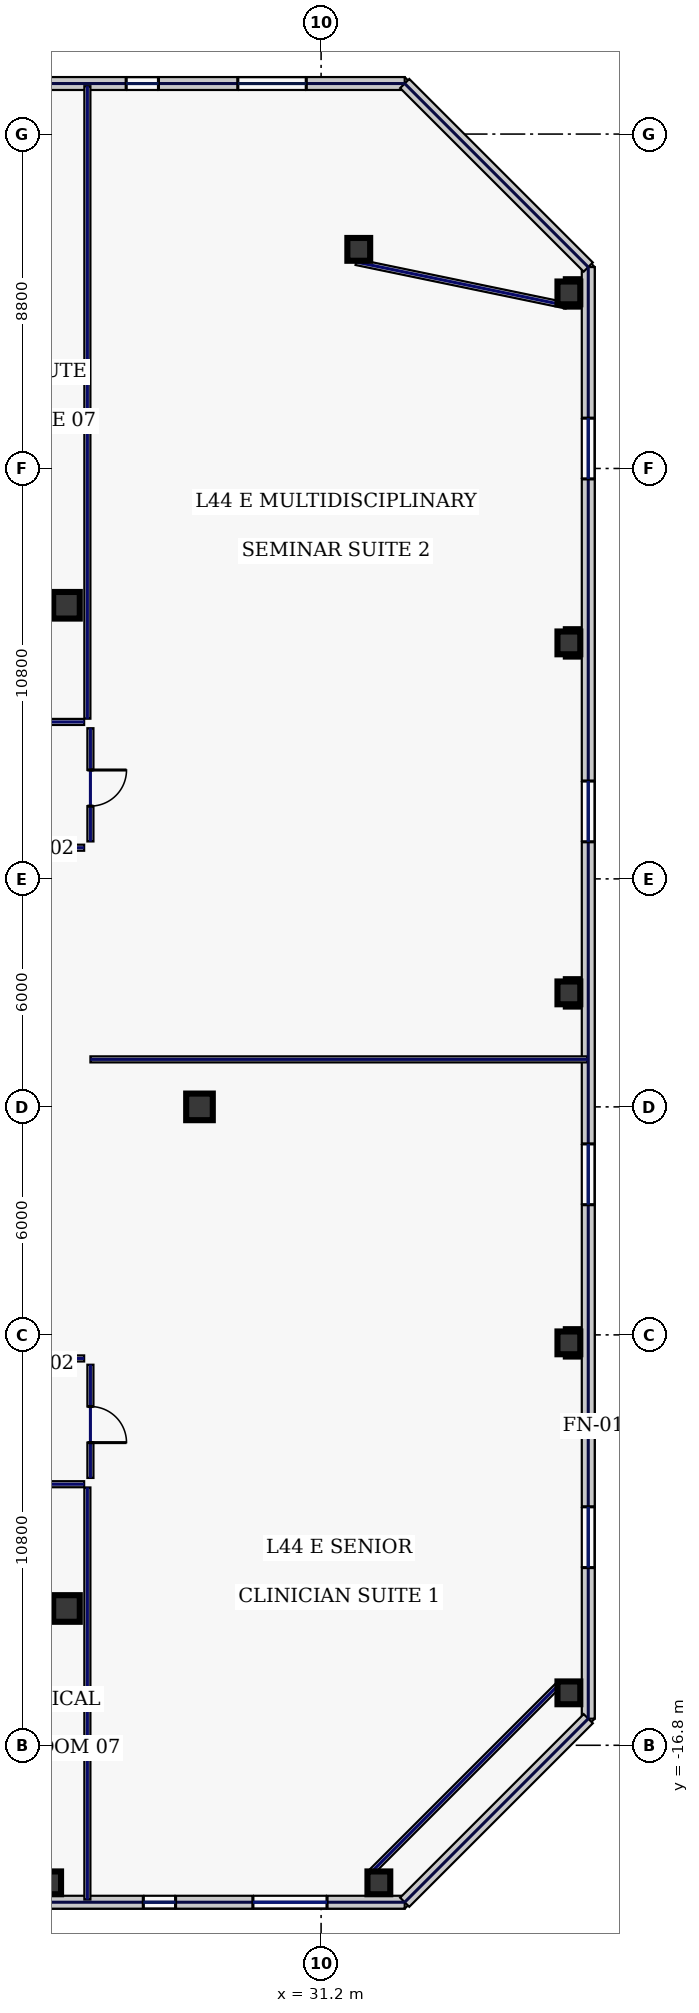
"""IFC4 building model, lengths in metres.
Left out: names, types, materials, properties, quantities, classifications, styles, units other than length and angle.
Written with IfcOpenShell. Run it as: python <this file> out.ifc"""

import sys

from ifc_helpers import new_model, si_unit, direction, frame, frame_2d, origin, origin_2d, place, context, subcontext, project, spatial, rectangle, hollow_rectangle, extrude, element, fill, save


model = new_model("IFC4")
c1 = context("Model", 3, precision=1e-05, world=origin(), true_north=direction((0.0, 1.0)))
c2 = subcontext(c1, "Body", "Model", "MODEL_VIEW")
j1 = project(units=[si_unit("LENGTHUNIT", "METRE"), si_unit("PLANEANGLEUNIT", "RADIAN")], contexts=[c1])
p1 = place(None, origin())
s1 = spatial("IfcSite", under=j1, at=p1, CompositionType="ELEMENT")
p2 = place(p1, origin())
s2 = spatial("IfcBuilding", under=s1, at=p2, CompositionType="ELEMENT")
p3 = place(p2, frame((0.0, 0.0, 192.2)))
s3 = spatial("IfcBuildingStorey", under=s2, at=p3, CompositionType="ELEMENT", Elevation=192.2)
for number, where, z_axis, x_axis in (
    (1, (24.5, -13.2, 0.0), (0.0, 0.0, 1.0), (1.0, 0.0, 0.0)),
    (2, (24.5, 13.2, 0.0), (0.0, 0.0, 1.0), (1.0, 0.0, 0.0)),
    (3, (28.0, 0.0, 0.0), (0.0, 0.0, 1.0), (1.0, 0.0, 0.0)),
):
    element("IfcColumn", number, at=place(p3, frame(where, z_axis=z_axis, x_axis=x_axis)), inside=s3, PredefinedType="COLUMN", context=c2, shape_type="SweptSolid", body=[
        extrude(hollow_rectangle(XDim=0.7, YDim=0.7, WallThickness=0.032, at=origin_2d()), origin(), (0.0, 0.0, 1.0), 3.74),
    ])
for number, where, z_axis, x_axis in (
    (4, (24.057, -20.42, 0.0), (0.0, 0.0, 1.0), (1.0, 0.0, 0.0)),
    (5, (32.72, -20.42, 0.0), (0.0, 0.0, 1.0), (1.0, 0.0, 0.0)),
    (6, (32.191, 22.566, 0.0), (0.0, 0.0, 1.0), (1.0, 0.0, 0.0)),
    (7, (37.72, -15.42, 0.0), (0.0, 0.0, 1.0), (1.0, 0.0, 0.0)),
    (8, (37.72, -6.21, 0.0), (0.0, 0.0, 1.0), (1.0, 0.0, 0.0)),
    (9, (37.72, 3.0, 0.0), (0.0, 0.0, 1.0), (1.0, 0.0, 0.0)),
    (10, (37.72, 12.21, 0.0), (0.0, 0.0, 1.0), (1.0, 0.0, 0.0)),
    (11, (37.72, 21.42, 0.0), (0.0, 0.0, 1.0), (1.0, 0.0, 0.0)),
):
    element("IfcColumn", number, at=place(p3, frame(where, z_axis=z_axis, x_axis=x_axis)), inside=s3, PredefinedType="COLUMN", context=c2, shape_type="SweptSolid", body=[
        extrude(hollow_rectangle(XDim=0.6, YDim=0.6, WallThickness=0.028, at=origin_2d()), origin(), (0.0, 0.0, 1.0), 3.74),
    ])
p4 = place(p3, frame((13.463, -20.93, 0.0), z_axis=(0.0, 0.0, 1.0), x_axis=(1.0, 0.0, 0.0)))
e12 = element("IfcWall", 12, at=p4, inside=s3, PredefinedType="STANDARD", context=c2, shape_type="SweptSolid", body=[
    extrude(rectangle(XDim=19.937, YDim=0.34, at=frame_2d((9.969, 0.0))), origin(), (0.0, 0.0, 1.0), 3.74),
])
p5 = place(p4, frame((3.295, 0.0, 0.8)))
e13 = element("IfcOpeningElement", 13, at=p5, cuts=e12, PredefinedType="OPENING", context=c2, shape_type="SweptSolid", body=[
    extrude(rectangle(XDim=1.95, YDim=2.1, at=frame_2d((0.975, 1.05))), frame((0.0, 0.18, 0.0), z_axis=(0.0, -1.0, 0.0), x_axis=(1.0, 0.0, 0.0)), (0.0, 0.0, 1.0), 0.36),
])
p6 = place(p4, frame((7.28, 0.0, 0.8)))
e14 = element("IfcOpeningElement", 14, at=p6, cuts=e12, PredefinedType="OPENING", context=c2, shape_type="SweptSolid", body=[
    extrude(rectangle(XDim=1.95, YDim=2.1, at=frame_2d((0.975, 1.05))), frame((0.0, 0.18, 0.0), z_axis=(0.0, -1.0, 0.0), x_axis=(1.0, 0.0, 0.0)), (0.0, 0.0, 1.0), 0.36),
])
p7 = place(p4, frame((13.058, 0.0, 0.8)))
e15 = element("IfcOpeningElement", 15, at=p7, cuts=e12, PredefinedType="OPENING", context=c2, shape_type="SweptSolid", body=[
    extrude(rectangle(XDim=0.85, YDim=1.85, at=frame_2d((0.425, 0.925))), frame((0.0, 0.18, 0.0), z_axis=(0.0, -1.0, 0.0), x_axis=(1.0, 0.0, 0.0)), (0.0, 0.0, 1.0), 0.36),
])
p8 = place(p4, frame((15.943, 0.0, 0.8)))
e16 = element("IfcOpeningElement", 16, at=p8, cuts=e12, PredefinedType="OPENING", context=c2, shape_type="SweptSolid", body=[
    extrude(rectangle(XDim=1.95, YDim=2.1, at=frame_2d((0.975, 1.05))), frame((0.0, 0.18, 0.0), z_axis=(0.0, -1.0, 0.0), x_axis=(1.0, 0.0, 0.0)), (0.0, 0.0, 1.0), 0.36),
])
p9 = place(p3, frame((33.4, 26.93, 0.0), z_axis=(0.0, 0.0, 1.0), x_axis=(-1.0, 0.0, 0.0)))
e17 = element("IfcWall", 17, at=p9, inside=s3, PredefinedType="STANDARD", context=c2, shape_type="SweptSolid", body=[
    extrude(rectangle(XDim=20.09, YDim=0.34, at=frame_2d((10.045, 0.0))), origin(), (0.0, 0.0, 1.0), 3.74),
])
p10 = place(p9, frame((15.005, 0.0, 0.7)))
e18 = element("IfcOpeningElement", 18, at=p10, cuts=e17, PredefinedType="OPENING", context=c2, shape_type="SweptSolid", body=[
    extrude(rectangle(XDim=1.8, YDim=2.2, at=frame_2d((0.9, 1.1))), frame((0.0, 0.18, 0.0), z_axis=(0.0, -1.0, 0.0), x_axis=(1.0, 0.0, 0.0)), (0.0, 0.0, 1.0), 0.36),
])
p11 = place(p9, frame((11.071, 0.0, 0.7)))
e19 = element("IfcOpeningElement", 19, at=p11, cuts=e17, PredefinedType="OPENING", context=c2, shape_type="SweptSolid", body=[
    extrude(rectangle(XDim=1.8, YDim=2.2, at=frame_2d((0.9, 1.1))), frame((0.0, 0.18, 0.0), z_axis=(0.0, -1.0, 0.0), x_axis=(1.0, 0.0, 0.0)), (0.0, 0.0, 1.0), 0.36),
])
p12 = place(p9, frame((6.48, 0.0, 0.7)))
e20 = element("IfcOpeningElement", 20, at=p12, cuts=e17, PredefinedType="OPENING", context=c2, shape_type="SweptSolid", body=[
    extrude(rectangle(XDim=0.85, YDim=1.85, at=frame_2d((0.425, 0.925))), frame((0.0, 0.18, 0.0), z_axis=(0.0, -1.0, 0.0), x_axis=(1.0, 0.0, 0.0)), (0.0, 0.0, 1.0), 0.36),
])
p13 = place(p9, frame((2.591, 0.0, 0.7)))
e21 = element("IfcOpeningElement", 21, at=p13, cuts=e17, PredefinedType="OPENING", context=c2, shape_type="SweptSolid", body=[
    extrude(rectangle(XDim=1.8, YDim=2.2, at=frame_2d((0.9, 1.1))), frame((0.0, 0.18, 0.0), z_axis=(0.0, -1.0, 0.0), x_axis=(1.0, 0.0, 0.0)), (0.0, 0.0, 1.0), 0.36),
])
p14 = place(p3, frame((38.23, -16.1, 0.0), z_axis=(0.0, 0.0, 1.0), x_axis=(0.0, 1.0, 0.0)))
e22 = element("IfcWall", 22, at=p14, inside=s3, PredefinedType="STANDARD", context=c2, shape_type="SweptSolid", body=[
    extrude(rectangle(XDim=38.2, YDim=0.34, at=frame_2d((19.1, 0.0))), origin(), (0.0, 0.0, 1.0), 3.74),
])
p15 = place(p14, frame((3.975, 0.0, 0.58)))
e23 = element("IfcOpeningElement", 23, at=p15, cuts=e22, PredefinedType="OPENING", context=c2, shape_type="SweptSolid", body=[
    extrude(rectangle(XDim=1.6, YDim=2.3, at=frame_2d((0.8, 1.15))), frame((0.0, 0.18, 0.0), z_axis=(0.0, -1.0, 0.0), x_axis=(1.0, 0.0, 0.0)), (0.0, 0.0, 1.0), 0.36),
])
p16 = place(p14, frame((13.525, 0.0, 0.58)))
e24 = element("IfcOpeningElement", 24, at=p16, cuts=e22, PredefinedType="OPENING", context=c2, shape_type="SweptSolid", body=[
    extrude(rectangle(XDim=1.6, YDim=2.3, at=frame_2d((0.8, 1.15))), frame((0.0, 0.18, 0.0), z_axis=(0.0, -1.0, 0.0), x_axis=(1.0, 0.0, 0.0)), (0.0, 0.0, 1.0), 0.36),
])
p17 = place(p14, frame((23.075, 0.0, 0.58)))
e25 = element("IfcOpeningElement", 25, at=p17, cuts=e22, PredefinedType="OPENING", context=c2, shape_type="SweptSolid", body=[
    extrude(rectangle(XDim=1.6, YDim=2.3, at=frame_2d((0.8, 1.15))), frame((0.0, 0.18, 0.0), z_axis=(0.0, -1.0, 0.0), x_axis=(1.0, 0.0, 0.0)), (0.0, 0.0, 1.0), 0.36),
])
p18 = place(p14, frame((32.625, 0.0, 0.58)))
e26 = element("IfcOpeningElement", 26, at=p18, cuts=e22, PredefinedType="OPENING", context=c2, shape_type="SweptSolid", body=[
    extrude(rectangle(XDim=1.6, YDim=2.3, at=frame_2d((0.8, 1.15))), frame((0.0, 0.18, 0.0), z_axis=(0.0, -1.0, 0.0), x_axis=(1.0, 0.0, 0.0)), (0.0, 0.0, 1.0), 0.36),
])
for number, where, z_axis, x_axis in (
    (27, (33.4, -20.93, 0.0), (0.0, 0.0, 1.0), (0.707, 0.707, 0.0)),
    (28, (38.23, 22.1, 0.0), (0.0, 0.0, 1.0), (-0.707, 0.707, 0.0)),
):
    element("IfcWall", number, at=place(p3, frame(where, z_axis=z_axis, x_axis=x_axis)), inside=s3, PredefinedType="STANDARD", context=c2, shape_type="SweptSolid", body=[
        extrude(rectangle(XDim=6.831, YDim=0.34, at=frame_2d((3.415, 0.0))), origin(), (0.0, 0.0, 1.0), 3.74),
    ])
p19 = place(p3, frame((32.479, -20.18, 0.0), z_axis=(0.0, 0.0, 1.0), x_axis=(0.707106781187, 0.707106781187, 0.0)))
e29 = element("IfcWall", 29, at=p19, inside=s3, PredefinedType="PARTITIONING", context=c2, shape_type="SweptSolid", body=[
    extrude(rectangle(XDim=7.071, YDim=0.16, at=frame_2d((3.536, 0.0))), origin(), (0.0, 0.0, 1.0), 3.74),
])
p20 = place(p3, frame((37.651, 21.087, 0.0), z_axis=(0.0, 0.0, 1.0), x_axis=(-0.979184618318, 0.202971631636, 0.0)))
e30 = element("IfcWall", 30, at=p20, inside=s3, PredefinedType="PARTITIONING", context=c2, shape_type="SweptSolid", body=[
    extrude(rectangle(XDim=5.646, YDim=0.16, at=frame_2d((2.823, 0.0))), origin(), (0.0, 0.0, 1.0), 3.74),
])
p21 = place(p3, frame((-24.965, 10.13, 0.0), z_axis=(0.0, 0.0, 1.0), x_axis=(1.0, 0.0, 0.0)))
e31 = element("IfcWall", 31, at=p21, inside=s3, PredefinedType="PARTITIONING", context=c2, shape_type="SweptSolid", body=[
    extrude(rectangle(XDim=49.93, YDim=0.16, at=frame_2d((24.965, 0.0))), origin(), (0.0, 0.0, 1.0), 3.74),
])
p22 = place(p21, frame((2.044, 0.0, 0.0)))
e32 = element("IfcOpeningElement", 32, at=p22, cuts=e31, PredefinedType="OPENING", context=c2, shape_type="SweptSolid", body=[
    extrude(rectangle(XDim=0.95, YDim=2.2, at=frame_2d((0.475, 1.1))), frame((0.0, 0.09, 0.0), z_axis=(0.0, -1.0, 0.0), x_axis=(1.0, 0.0, 0.0)), (0.0, 0.0, 1.0), 0.18),
])
p23 = place(p21, frame((7.775, 0.0, 0.0)))
e33 = element("IfcOpeningElement", 33, at=p23, cuts=e31, PredefinedType="OPENING", context=c2, shape_type="SweptSolid", body=[
    extrude(rectangle(XDim=0.95, YDim=2.2, at=frame_2d((0.475, 1.1))), frame((0.0, 0.09, 0.0), z_axis=(0.0, -1.0, 0.0), x_axis=(1.0, 0.0, 0.0)), (0.0, 0.0, 1.0), 0.18),
])
p24 = place(p21, frame((15.275, 0.0, 0.0)))
e34 = element("IfcOpeningElement", 34, at=p24, cuts=e31, PredefinedType="OPENING", context=c2, shape_type="SweptSolid", body=[
    extrude(rectangle(XDim=0.95, YDim=2.2, at=frame_2d((0.475, 1.1))), frame((0.0, 0.09, 0.0), z_axis=(0.0, -1.0, 0.0), x_axis=(1.0, 0.0, 0.0)), (0.0, 0.0, 1.0), 0.18),
])
p25 = place(p21, frame((21.475, 0.0, 0.0)))
e35 = element("IfcOpeningElement", 35, at=p25, cuts=e31, PredefinedType="OPENING", context=c2, shape_type="SweptSolid", body=[
    extrude(rectangle(XDim=1.3, YDim=2.2, at=frame_2d((0.65, 1.1))), frame((0.0, 0.09, 0.0), z_axis=(0.0, -1.0, 0.0), x_axis=(1.0, 0.0, 0.0)), (0.0, 0.0, 1.0), 0.18),
])
p26 = place(p21, frame((26.15, 0.0, 0.0)))
e36 = element("IfcOpeningElement", 36, at=p26, cuts=e31, PredefinedType="OPENING", context=c2, shape_type="SweptSolid", body=[
    extrude(rectangle(XDim=0.95, YDim=2.2, at=frame_2d((0.475, 1.1))), frame((0.0, 0.09, 0.0), z_axis=(0.0, -1.0, 0.0), x_axis=(1.0, 0.0, 0.0)), (0.0, 0.0, 1.0), 0.18),
])
p27 = place(p21, frame((32.575, 0.0, 0.0)))
e37 = element("IfcOpeningElement", 37, at=p27, cuts=e31, PredefinedType="OPENING", context=c2, shape_type="SweptSolid", body=[
    extrude(rectangle(XDim=0.95, YDim=2.2, at=frame_2d((0.475, 1.1))), frame((0.0, 0.09, 0.0), z_axis=(0.0, -1.0, 0.0), x_axis=(1.0, 0.0, 0.0)), (0.0, 0.0, 1.0), 0.18),
])
p28 = place(p21, frame((40.675, 0.0, 0.0)))
e38 = element("IfcOpeningElement", 38, at=p28, cuts=e31, PredefinedType="OPENING", context=c2, shape_type="SweptSolid", body=[
    extrude(rectangle(XDim=0.95, YDim=2.2, at=frame_2d((0.475, 1.1))), frame((0.0, 0.09, 0.0), z_axis=(0.0, -1.0, 0.0), x_axis=(1.0, 0.0, 0.0)), (0.0, 0.0, 1.0), 0.18),
])
p29 = place(p21, frame((46.631, 0.0, 0.0)))
e39 = element("IfcOpeningElement", 39, at=p29, cuts=e31, PredefinedType="OPENING", context=c2, shape_type="SweptSolid", body=[
    extrude(rectangle(XDim=1.3, YDim=2.2, at=frame_2d((0.65, 1.1))), frame((0.0, 0.09, 0.0), z_axis=(0.0, -1.0, 0.0), x_axis=(1.0, 0.0, 0.0)), (0.0, 0.0, 1.0), 0.18),
])
p30 = place(p3, frame((25.13, 9.965, 0.0), z_axis=(0.0, 0.0, 1.0), x_axis=(0.0, -1.0, 0.0)))
e40 = element("IfcWall", 40, at=p30, inside=s3, PredefinedType="PARTITIONING", context=c2, shape_type="SweptSolid", body=[
    extrude(rectangle(XDim=2.98, YDim=0.16, at=frame_2d((1.49, 0.0))), origin(), (0.0, 0.0, 1.0), 3.74),
])
p31 = place(p30, frame((1.1, 0.0, 0.0)))
e41 = element("IfcOpeningElement", 41, at=p31, cuts=e40, PredefinedType="OPENING", context=c2, shape_type="SweptSolid", body=[
    extrude(rectangle(XDim=0.95, YDim=2.2, at=frame_2d((0.475, 1.1))), frame((0.0, 0.09, 0.0), z_axis=(0.0, -1.0, 0.0), x_axis=(1.0, 0.0, 0.0)), (0.0, 0.0, 1.0), 0.18),
])
for number, where, z_axis, x_axis in (
    (42, (24.965, 6.82, 0.0), (0.0, 0.0, 1.0), (-1.0, 0.0, 0.0)),
    (43, (10.63, -6.62, 0.0), (0.0, 0.0, 1.0), (1.0, 0.0, 0.0)),
):
    element("IfcWall", number, at=place(p3, frame(where, z_axis=z_axis, x_axis=x_axis)), inside=s3, PredefinedType="PARTITIONING", context=c2, shape_type="SweptSolid", body=[
        extrude(rectangle(XDim=14.335, YDim=0.16, at=frame_2d((7.167, 0.0))), origin(), (0.0, 0.0, 1.0), 3.74),
    ])
p32 = place(p3, frame((25.13, -6.785, 0.0), z_axis=(0.0, 0.0, 1.0), x_axis=(0.0, -1.0, 0.0)))
e44 = element("IfcWall", 44, at=p32, inside=s3, PredefinedType="PARTITIONING", context=c2, shape_type="SweptSolid", body=[
    extrude(rectangle(XDim=2.98, YDim=0.16, at=frame_2d((1.49, 0.0))), origin(), (0.0, 0.0, 1.0), 3.74),
])
p33 = place(p32, frame((1.1, 0.0, 0.0)))
e45 = element("IfcOpeningElement", 45, at=p33, cuts=e44, PredefinedType="OPENING", context=c2, shape_type="SweptSolid", body=[
    extrude(rectangle(XDim=0.95, YDim=2.2, at=frame_2d((0.475, 1.1))), frame((0.0, 0.09, 0.0), z_axis=(0.0, -1.0, 0.0), x_axis=(1.0, 0.0, 0.0)), (0.0, 0.0, 1.0), 0.18),
])
p34 = place(p3, frame((24.965, -9.93, 0.0), z_axis=(0.0, 0.0, 1.0), x_axis=(-1.0, 0.0, 0.0)))
e46 = element("IfcWall", 46, at=p34, inside=s3, PredefinedType="PARTITIONING", context=c2, shape_type="SweptSolid", body=[
    extrude(rectangle(XDim=49.93, YDim=0.16, at=frame_2d((24.965, 0.0))), origin(), (0.0, 0.0, 1.0), 3.74),
])
p35 = place(p34, frame((47.106, 0.0, 0.0)))
e47 = element("IfcOpeningElement", 47, at=p35, cuts=e46, PredefinedType="OPENING", context=c2, shape_type="SweptSolid", body=[
    extrude(rectangle(XDim=0.95, YDim=2.2, at=frame_2d((0.475, 1.1))), frame((0.0, 0.09, 0.0), z_axis=(0.0, -1.0, 0.0), x_axis=(1.0, 0.0, 0.0)), (0.0, 0.0, 1.0), 0.18),
])
p36 = place(p34, frame((41.375, 0.0, 0.0)))
e48 = element("IfcOpeningElement", 48, at=p36, cuts=e46, PredefinedType="OPENING", context=c2, shape_type="SweptSolid", body=[
    extrude(rectangle(XDim=0.95, YDim=2.2, at=frame_2d((0.475, 1.1))), frame((0.0, 0.09, 0.0), z_axis=(0.0, -1.0, 0.0), x_axis=(1.0, 0.0, 0.0)), (0.0, 0.0, 1.0), 0.18),
])
p37 = place(p34, frame((33.875, 0.0, 0.0)))
e49 = element("IfcOpeningElement", 49, at=p37, cuts=e46, PredefinedType="OPENING", context=c2, shape_type="SweptSolid", body=[
    extrude(rectangle(XDim=0.95, YDim=2.2, at=frame_2d((0.475, 1.1))), frame((0.0, 0.09, 0.0), z_axis=(0.0, -1.0, 0.0), x_axis=(1.0, 0.0, 0.0)), (0.0, 0.0, 1.0), 0.18),
])
p38 = place(p34, frame((25.3, 0.0, 0.0)))
e50 = element("IfcOpeningElement", 50, at=p38, cuts=e46, PredefinedType="OPENING", context=c2, shape_type="SweptSolid", body=[
    extrude(rectangle(XDim=1.3, YDim=2.2, at=frame_2d((0.65, 1.1))), frame((0.0, 0.09, 0.0), z_axis=(0.0, -1.0, 0.0), x_axis=(1.0, 0.0, 0.0)), (0.0, 0.0, 1.0), 0.18),
])
p39 = place(p34, frame((16.4, 0.0, 0.0)))
e51 = element("IfcOpeningElement", 51, at=p39, cuts=e46, PredefinedType="OPENING", context=c2, shape_type="SweptSolid", body=[
    extrude(rectangle(XDim=1.3, YDim=2.2, at=frame_2d((0.65, 1.1))), frame((0.0, 0.09, 0.0), z_axis=(0.0, -1.0, 0.0), x_axis=(1.0, 0.0, 0.0)), (0.0, 0.0, 1.0), 0.18),
])
p40 = place(p34, frame((8.475, 0.0, 0.0)))
e52 = element("IfcOpeningElement", 52, at=p40, cuts=e46, PredefinedType="OPENING", context=c2, shape_type="SweptSolid", body=[
    extrude(rectangle(XDim=0.95, YDim=2.2, at=frame_2d((0.475, 1.1))), frame((0.0, 0.09, 0.0), z_axis=(0.0, -1.0, 0.0), x_axis=(1.0, 0.0, 0.0)), (0.0, 0.0, 1.0), 0.18),
])
p41 = place(p34, frame((2.344, 0.0, 0.0)))
e53 = element("IfcOpeningElement", 53, at=p41, cuts=e46, PredefinedType="OPENING", context=c2, shape_type="SweptSolid", body=[
    extrude(rectangle(XDim=0.95, YDim=2.2, at=frame_2d((0.475, 1.1))), frame((0.0, 0.09, 0.0), z_axis=(0.0, -1.0, 0.0), x_axis=(1.0, 0.0, 0.0)), (0.0, 0.0, 1.0), 0.18),
])
p42 = place(p3, frame((25.05, 10.215, 0.0), z_axis=(0.0, 0.0, 1.0), x_axis=(0.0, 1.0, 0.0)))
e54 = element("IfcWall", 54, at=p42, inside=s3, PredefinedType="PARTITIONING", context=c2, shape_type="SweptSolid", body=[
    extrude(rectangle(XDim=16.645, YDim=0.16, at=frame_2d((8.323, 0.0))), origin(), (0.0, 0.0, 1.0), 3.74),
])
p43 = place(p3, frame((25.05, -20.86, 0.0), z_axis=(0.0, 0.0, 1.0), x_axis=(0.0, 1.0, 0.0)))
e55 = element("IfcWall", 55, at=p43, inside=s3, PredefinedType="PARTITIONING", context=c2, shape_type="SweptSolid", body=[
    extrude(rectangle(XDim=10.845, YDim=0.16, at=frame_2d((5.423, 0.0))), origin(), (0.0, 0.0, 1.0), 3.74),
])
p44 = place(p3, frame((25.13, 1.25, 0.0), z_axis=(0.0, 0.0, 1.0), x_axis=(1.0, 0.0, 0.0)))
e56 = element("IfcWall", 56, at=p44, inside=s3, PredefinedType="PARTITIONING", context=c2, shape_type="SweptSolid", body=[
    extrude(rectangle(XDim=13.08, YDim=0.16, at=frame_2d((6.54, 0.0))), origin(), (0.0, 0.0, 1.0), 3.285),
])
p45 = place(p7, origin())
e57 = element("IfcWindow", 57, at=p45, inside=s3, PartitioningType="SINGLE_PANEL", PredefinedType="WINDOW", context=c2, shape_type="SweptSolid", body=[
    extrude(rectangle(XDim=0.85, YDim=1.85, at=frame_2d((0.425, 0.925))), frame((0.0, 0.03, 0.0), z_axis=(0.0, -1.0, 0.0), x_axis=(1.0, 0.0, 0.0)), (0.0, 0.0, 1.0), 0.06),
])
fill(e15, e57)
p46 = place(p8, origin())
e58 = element("IfcWindow", 58, at=p46, inside=s3, PartitioningType="SINGLE_PANEL", PredefinedType="WINDOW", context=c2, shape_type="SweptSolid", body=[
    extrude(rectangle(XDim=1.95, YDim=2.1, at=frame_2d((0.975, 1.05))), frame((0.0, 0.03, 0.0), z_axis=(0.0, -1.0, 0.0), x_axis=(1.0, 0.0, 0.0)), (0.0, 0.0, 1.0), 0.06),
])
fill(e16, e58)
p47 = place(p12, origin())
e59 = element("IfcWindow", 59, at=p47, inside=s3, PartitioningType="SINGLE_PANEL", PredefinedType="WINDOW", context=c2, shape_type="SweptSolid", body=[
    extrude(rectangle(XDim=0.85, YDim=1.85, at=frame_2d((0.425, 0.925))), frame((0.0, 0.03, 0.0), z_axis=(0.0, -1.0, 0.0), x_axis=(1.0, 0.0, 0.0)), (0.0, 0.0, 1.0), 0.06),
])
fill(e20, e59)
p48 = place(p13, origin())
e60 = element("IfcWindow", 60, at=p48, inside=s3, PartitioningType="SINGLE_PANEL", PredefinedType="WINDOW", context=c2, shape_type="SweptSolid", body=[
    extrude(rectangle(XDim=1.8, YDim=2.2, at=frame_2d((0.9, 1.1))), frame((0.0, 0.03, 0.0), z_axis=(0.0, -1.0, 0.0), x_axis=(1.0, 0.0, 0.0)), (0.0, 0.0, 1.0), 0.06),
])
fill(e21, e60)
p49 = place(p15, origin())
e61 = element("IfcWindow", 61, at=p49, inside=s3, PartitioningType="SINGLE_PANEL", PredefinedType="WINDOW", context=c2, shape_type="SweptSolid", body=[
    extrude(rectangle(XDim=1.6, YDim=2.3, at=frame_2d((0.8, 1.15))), frame((0.0, 0.03, 0.0), z_axis=(0.0, -1.0, 0.0), x_axis=(1.0, 0.0, 0.0)), (0.0, 0.0, 1.0), 0.06),
])
fill(e23, e61)
p50 = place(p16, origin())
e62 = element("IfcWindow", 62, at=p50, inside=s3, PartitioningType="SINGLE_PANEL", PredefinedType="WINDOW", context=c2, shape_type="SweptSolid", body=[
    extrude(rectangle(XDim=1.6, YDim=2.3, at=frame_2d((0.8, 1.15))), frame((0.0, 0.03, 0.0), z_axis=(0.0, -1.0, 0.0), x_axis=(1.0, 0.0, 0.0)), (0.0, 0.0, 1.0), 0.06),
])
fill(e24, e62)
p51 = place(p17, origin())
e63 = element("IfcWindow", 63, at=p51, inside=s3, PartitioningType="SINGLE_PANEL", PredefinedType="WINDOW", context=c2, shape_type="SweptSolid", body=[
    extrude(rectangle(XDim=1.6, YDim=2.3, at=frame_2d((0.8, 1.15))), frame((0.0, 0.03, 0.0), z_axis=(0.0, -1.0, 0.0), x_axis=(1.0, 0.0, 0.0)), (0.0, 0.0, 1.0), 0.06),
])
fill(e25, e63)
p52 = place(p18, origin())
e64 = element("IfcWindow", 64, at=p52, inside=s3, PartitioningType="SINGLE_PANEL", PredefinedType="WINDOW", context=c2, shape_type="SweptSolid", body=[
    extrude(rectangle(XDim=1.6, YDim=2.3, at=frame_2d((0.8, 1.15))), frame((0.0, 0.03, 0.0), z_axis=(0.0, -1.0, 0.0), x_axis=(1.0, 0.0, 0.0)), (0.0, 0.0, 1.0), 0.06),
])
fill(e26, e64)
p53 = place(p33, origin())
e65 = element("IfcDoor", 65, at=p53, inside=s3, OperationType="SINGLE_SWING_RIGHT", PredefinedType="DOOR", context=c2, shape_type="SweptSolid", body=[
    extrude(rectangle(XDim=0.95, YDim=2.2, at=frame_2d((0.475, 1.1))), frame((0.0, 0.025, 0.0), z_axis=(0.0, -1.0, 0.0), x_axis=(1.0, 0.0, 0.0)), (0.0, 0.0, 1.0), 0.05),
])
fill(e45, e65)
p54 = place(p31, origin())
e66 = element("IfcDoor", 66, at=p54, inside=s3, OperationType="SINGLE_SWING_LEFT", PredefinedType="DOOR", context=c2, shape_type="SweptSolid", body=[
    extrude(rectangle(XDim=0.95, YDim=2.2, at=frame_2d((0.475, 1.1))), frame((0.0, 0.025, 0.0), z_axis=(0.0, -1.0, 0.0), x_axis=(1.0, 0.0, 0.0)), (0.0, 0.0, 1.0), 0.05),
])
fill(e41, e66)
save(model, sys.argv[1])
